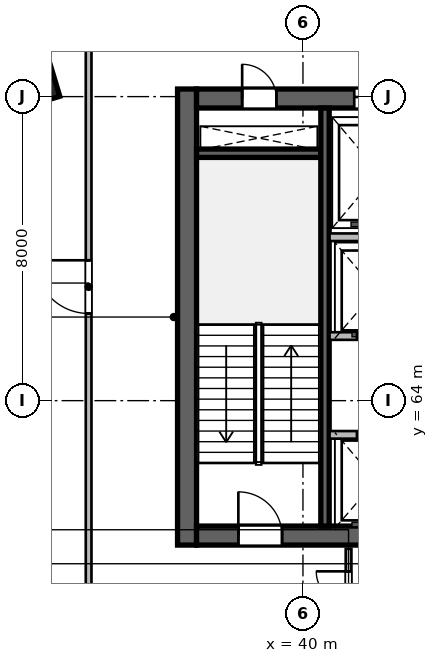
"""IFC4 building model, lengths in metres.
Left out: names, types, materials, properties, quantities, classifications, styles, units other than length and angle.
Written with IfcOpenShell. Run it as: python <this file> out.ifc"""

import sys

from ifc_helpers import new_model, si_unit, direction, frame, frame_2d, origin, origin_2d, place, context, subcontext, project, spatial, rectangle, extrude, source, transform, mapped, element, fill, save


model = new_model("IFC4")
c1 = context("Model", 3, precision=1e-05, world=origin(), true_north=direction((0.0, 1.0)))
c2 = subcontext(c1, "Body", "Model", "MODEL_VIEW")
j1 = project(units=[si_unit("LENGTHUNIT", "METRE"), si_unit("PLANEANGLEUNIT", "RADIAN")], contexts=[c1])
p1 = place(None, origin())
s1 = spatial("IfcSite", under=j1, at=p1, CompositionType="ELEMENT")
p2 = place(p1, origin())
s2 = spatial("IfcBuilding", under=s1, at=p2, CompositionType="ELEMENT")
p3 = place(p2, frame((0.0, 0.0, 91.2)))
s3 = spatial("IfcBuildingStorey", under=s2, at=p3, CompositionType="ELEMENT", Elevation=91.2)
m1 = source(origin(), c2, "Body", "SweptSolid", [
    extrude(rectangle(XDim=12.0, YDim=0.5, at=frame_2d((6.0, 0.0))), origin(), (0.0, 0.0, 1.0), 4.8),
])
p4 = place(p3, frame((36.95, 60.2, 0.0), z_axis=(0.0, 0.0, 1.0), x_axis=(0.0, 1.0, 0.0)))
e1 = element("IfcWall", 1, at=p4, inside=s3, PredefinedType="SHEAR", context=c2, shape_type="MappedRepresentation", body=[
    mapped(m1, transform((0.0, 0.0, 0.0), scale=1.0)),
])
m2 = source(origin(), c2, "Body", "SweptSolid", [
    extrude(rectangle(XDim=21.6, YDim=0.5, at=frame_2d((10.8, 0.0))), origin(), (0.0, 0.0, 1.0), 4.8),
])
p5 = place(p3, frame((37.2, 60.45, 0.0), z_axis=(0.0, 0.0, 1.0), x_axis=(1.0, 0.0, 0.0)))
e2 = element("IfcWall", 2, at=p5, inside=s3, PredefinedType="SHEAR", context=c2, shape_type="MappedRepresentation", body=[
    mapped(m2, transform((0.0, 0.0, 0.0), scale=1.0)),
])
p6 = place(p5, frame((1.1, 0.0, 0.0)))
e3 = element("IfcOpeningElement", 3, at=p6, cuts=e2, PredefinedType="OPENING", context=c2, shape_type="SweptSolid", body=[
    extrude(rectangle(XDim=1.15, YDim=2.15, at=frame_2d((0.575, 1.075))), frame((0.0, 0.26, 0.0), z_axis=(0.0, -1.0, 0.0), x_axis=(1.0, 0.0, 0.0)), (0.0, 0.0, 1.0), 0.52),
])
p7 = place(p5, frame((19.5, 0.0, 0.0)))
e4 = element("IfcOpeningElement", 4, at=p7, cuts=e2, PredefinedType="OPENING", context=c2, shape_type="SweptSolid", body=[
    extrude(rectangle(XDim=0.9, YDim=2.1, at=frame_2d((0.45, 1.05))), frame((0.0, 0.26, 0.0), z_axis=(0.0, -1.0, 0.0), x_axis=(1.0, 0.0, 0.0)), (0.0, 0.0, 1.0), 0.52),
])
p8 = place(p5, frame((12.02, 0.0, 0.0)))
e5 = element("IfcOpeningElement", 5, at=p8, cuts=e2, PredefinedType="OPENING", context=c2, shape_type="SweptSolid", body=[
    extrude(rectangle(XDim=1.6, YDim=2.15, at=frame_2d((0.8, 1.075))), frame((0.0, 0.26, 0.0), z_axis=(0.0, -1.0, 0.0), x_axis=(1.0, 0.0, 0.0)), (0.0, 0.0, 1.0), 0.52),
])
p9 = place(p3, frame((37.2, 71.95, 0.0), z_axis=(0.0, 0.0, 1.0), x_axis=(1.0, 0.0, 0.0)))
e6 = element("IfcWall", 6, at=p9, inside=s3, PredefinedType="SHEAR", context=c2, shape_type="MappedRepresentation", body=[
    mapped(m2, transform((0.0, 0.0, 0.0), scale=1.0)),
])
p10 = place(p9, frame((1.2, 0.0, 0.0)))
e7 = element("IfcOpeningElement", 7, at=p10, cuts=e6, PredefinedType="OPENING", context=c2, shape_type="SweptSolid", body=[
    extrude(rectangle(XDim=0.9, YDim=2.1, at=frame_2d((0.45, 1.05))), frame((0.0, 0.26, 0.0), z_axis=(0.0, -1.0, 0.0), x_axis=(1.0, 0.0, 0.0)), (0.0, 0.0, 1.0), 0.52),
])
p11 = place(p9, frame((14.7, 0.0, 0.0)))
e8 = element("IfcOpeningElement", 8, at=p11, cuts=e6, PredefinedType="OPENING", context=c2, shape_type="SweptSolid", body=[
    extrude(rectangle(XDim=1.2, YDim=2.15, at=frame_2d((0.6, 1.075))), frame((0.0, 0.26, 0.0), z_axis=(0.0, -1.0, 0.0), x_axis=(1.0, 0.0, 0.0)), (0.0, 0.0, 1.0), 0.52),
])
p12 = place(p9, frame((4.15, 0.0, 0.0)))
e9 = element("IfcOpeningElement", 9, at=p12, cuts=e6, PredefinedType="OPENING", context=c2, shape_type="SweptSolid", body=[
    extrude(rectangle(XDim=1.3, YDim=2.15, at=frame_2d((0.65, 1.075))), frame((0.0, 0.26, 0.0), z_axis=(0.0, -1.0, 0.0), x_axis=(1.0, 0.0, 0.0)), (0.0, 0.0, 1.0), 0.52),
])
p13 = place(p9, frame((7.25, 0.0, 0.0)))
e10 = element("IfcOpeningElement", 10, at=p13, cuts=e6, PredefinedType="OPENING", context=c2, shape_type="SweptSolid", body=[
    extrude(rectangle(XDim=0.9, YDim=2.1, at=frame_2d((0.45, 1.05))), frame((0.0, 0.26, 0.0), z_axis=(0.0, -1.0, 0.0), x_axis=(1.0, 0.0, 0.0)), (0.0, 0.0, 1.0), 0.52),
])
m3 = source(origin(), c2, "Body", "SweptSolid", [
    extrude(rectangle(XDim=3.27, YDim=0.22, at=frame_2d((1.635, 0.0))), origin(), (0.0, 0.0, 1.0), 4.8),
])
p14 = place(p3, frame((37.2, 70.51, 0.0), z_axis=(0.0, 0.0, 1.0), x_axis=(1.0, 0.0, 0.0)))
e11 = element("IfcWall", 11, at=p14, inside=s3, PredefinedType="SHEAR", context=c2, shape_type="MappedRepresentation", body=[
    mapped(m3, transform((0.0, 0.0, 0.0), scale=1.0)),
])
m4 = source(origin(), c2, "Body", "SweptSolid", [
    extrude(rectangle(XDim=11.0, YDim=0.22, at=frame_2d((5.5, 0.0))), origin(), (0.0, 0.0, 1.0), 4.8),
])
p15 = place(p3, frame((40.58, 60.7, 0.0), z_axis=(0.0, 0.0, 1.0), x_axis=(0.0, 1.0, 0.0)))
e12 = element("IfcWall", 12, at=p15, inside=s3, PredefinedType="SHEAR", context=c2, shape_type="MappedRepresentation", body=[
    mapped(m4, transform((0.0, 0.0, 0.0), scale=1.0)),
])
m5 = source(origin(), c2, "Body", "SweptSolid", [
    extrude(rectangle(XDim=1.3, YDim=1.3, at=origin_2d()), origin(), (0.0, 0.0, 1.0), 4.8),
])
p16 = place(p3, frame((32.791, 72.442, 0.0), z_axis=(0.0, 0.0, 1.0), x_axis=(-0.288697611798, 0.957420330337, 0.0)))
e13 = element("IfcColumn", 13, at=p16, inside=s3, PredefinedType="COLUMN", context=c2, shape_type="MappedRepresentation", body=[
    mapped(m5, transform((0.0, 0.0, 0.0), scale=1.0)),
])
m6 = source(origin(), c2, "Body", "SweptSolid", [
    extrude(rectangle(XDim=8.8, YDim=0.2, at=frame_2d((4.4, 0.0))), origin(), (0.0, 0.0, 1.0), 4.55),
])
p17 = place(p3, frame((40.7, 68.3, 0.0), z_axis=(0.0, 0.0, 1.0), x_axis=(1.0, 0.0, 0.0)))
e14 = element("IfcWall", 14, at=p17, inside=s3, PredefinedType="SOLIDWALL", context=c2, shape_type="MappedRepresentation", body=[
    mapped(m6, transform((0.0, 0.0, 0.0), scale=1.0)),
])
m7 = source(origin(), c2, "Body", "SweptSolid", [
    extrude(rectangle(XDim=8.02, YDim=0.2, at=frame_2d((4.01, 0.0))), origin(), (0.0, 0.0, 1.0), 4.55),
])
p18 = place(p3, frame((40.7, 63.1, 0.0), z_axis=(0.0, 0.0, 1.0), x_axis=(1.0, 0.0, 0.0)))
e15 = element("IfcWall", 15, at=p18, inside=s3, PredefinedType="SOLIDWALL", context=c2, shape_type="MappedRepresentation", body=[
    mapped(m7, transform((0.0, 0.0, 0.0), scale=1.0)),
])
p19 = place(p18, frame((0.72, 0.0, 0.0)))
e16 = element("IfcOpeningElement", 16, at=p19, cuts=e15, PredefinedType="OPENING", context=c2, shape_type="SweptSolid", body=[
    extrude(rectangle(XDim=1.0, YDim=2.15, at=frame_2d((0.5, 1.075))), frame((0.0, 0.11, 0.0), z_axis=(0.0, -1.0, 0.0), x_axis=(1.0, 0.0, 0.0)), (0.0, 0.0, 1.0), 0.22),
])
p20 = place(p18, frame((2.62, 0.0, 0.0)))
e17 = element("IfcOpeningElement", 17, at=p20, cuts=e15, PredefinedType="OPENING", context=c2, shape_type="SweptSolid", body=[
    extrude(rectangle(XDim=1.0, YDim=2.15, at=frame_2d((0.5, 1.075))), frame((0.0, 0.11, 0.0), z_axis=(0.0, -1.0, 0.0), x_axis=(1.0, 0.0, 0.0)), (0.0, 0.0, 1.0), 0.22),
])
p21 = place(p18, frame((4.55, 0.0, 0.0)))
e18 = element("IfcOpeningElement", 18, at=p21, cuts=e15, PredefinedType="OPENING", context=c2, shape_type="SweptSolid", body=[
    extrude(rectangle(XDim=1.0, YDim=2.15, at=frame_2d((0.5, 1.075))), frame((0.0, 0.11, 0.0), z_axis=(0.0, -1.0, 0.0), x_axis=(1.0, 0.0, 0.0)), (0.0, 0.0, 1.0), 0.22),
])
p22 = place(p18, frame((6.55, 0.0, 0.0)))
e19 = element("IfcOpeningElement", 19, at=p22, cuts=e15, PredefinedType="OPENING", context=c2, shape_type="SweptSolid", body=[
    extrude(rectangle(XDim=1.0, YDim=2.15, at=frame_2d((0.5, 1.075))), frame((0.0, 0.11, 0.0), z_axis=(0.0, -1.0, 0.0), x_axis=(1.0, 0.0, 0.0)), (0.0, 0.0, 1.0), 0.22),
])
p23 = place(p3, frame((40.7, 65.7, 0.0), z_axis=(0.0, 0.0, 1.0), x_axis=(1.0, 0.0, 0.0)))
e20 = element("IfcWall", 20, at=p23, inside=s3, PredefinedType="SOLIDWALL", context=c2, shape_type="MappedRepresentation", body=[
    mapped(m6, transform((0.0, 0.0, 0.0), scale=1.0)),
])
p24 = place(p23, frame((0.72, 0.0, 0.0)))
e21 = element("IfcOpeningElement", 21, at=p24, cuts=e20, PredefinedType="OPENING", context=c2, shape_type="SweptSolid", body=[
    extrude(rectangle(XDim=1.0, YDim=2.15, at=frame_2d((0.5, 1.075))), frame((0.0, 0.11, 0.0), z_axis=(0.0, -1.0, 0.0), x_axis=(1.0, 0.0, 0.0)), (0.0, 0.0, 1.0), 0.22),
])
p25 = place(p23, frame((2.62, 0.0, 0.0)))
e22 = element("IfcOpeningElement", 22, at=p25, cuts=e20, PredefinedType="OPENING", context=c2, shape_type="SweptSolid", body=[
    extrude(rectangle(XDim=1.0, YDim=2.15, at=frame_2d((0.5, 1.075))), frame((0.0, 0.11, 0.0), z_axis=(0.0, -1.0, 0.0), x_axis=(1.0, 0.0, 0.0)), (0.0, 0.0, 1.0), 0.22),
])
p26 = place(p23, frame((4.55, 0.0, 0.0)))
e23 = element("IfcOpeningElement", 23, at=p26, cuts=e20, PredefinedType="OPENING", context=c2, shape_type="SweptSolid", body=[
    extrude(rectangle(XDim=1.0, YDim=2.15, at=frame_2d((0.5, 1.075))), frame((0.0, 0.11, 0.0), z_axis=(0.0, -1.0, 0.0), x_axis=(1.0, 0.0, 0.0)), (0.0, 0.0, 1.0), 0.22),
])
p27 = place(p23, frame((6.55, 0.0, 0.0)))
e24 = element("IfcOpeningElement", 24, at=p27, cuts=e20, PredefinedType="OPENING", context=c2, shape_type="SweptSolid", body=[
    extrude(rectangle(XDim=1.0, YDim=2.15, at=frame_2d((0.5, 1.075))), frame((0.0, 0.11, 0.0), z_axis=(0.0, -1.0, 0.0), x_axis=(1.0, 0.0, 0.0)), (0.0, 0.0, 1.0), 0.22),
])
m8 = source(origin(), c2, "Body", "SweptSolid", [
    extrude(rectangle(XDim=2.033, YDim=0.15, at=frame_2d((1.016, 0.0))), origin(), (0.0, 0.0, 1.0), 4.55),
])
p28 = place(p3, frame((41.2, 58.067, 0.0), z_axis=(0.0, 0.0, 1.0), x_axis=(0.0, 1.0, 0.0)))
e25 = element("IfcWall", 25, at=p28, inside=s3, PredefinedType="PARTITIONING", context=c2, shape_type="MappedRepresentation", body=[
    mapped(m8, transform((0.0, 0.0, 0.0), scale=1.0)),
])
p29 = place(p28, frame((0.591, 0.0, 0.0)))
e26 = element("IfcOpeningElement", 26, at=p29, cuts=e25, PredefinedType="OPENING", context=c2, shape_type="SweptSolid", body=[
    extrude(rectangle(XDim=0.85, YDim=2.1, at=frame_2d((0.425, 1.05))), frame((0.0, 0.085, 0.0), z_axis=(0.0, -1.0, 0.0), x_axis=(1.0, 0.0, 0.0)), (0.0, 0.0, 1.0), 0.17),
])
m9 = source(origin(), c2, "Body", "SweptSolid", [
    extrude(rectangle(XDim=18.067, YDim=0.15, at=frame_2d((9.034, 0.0))), origin(), (0.0, 0.0, 1.0), 4.55),
])
p30 = place(p3, frame((34.36, 57.96, 0.0), z_axis=(0.0, 0.0, 1.0), x_axis=(0.0, 1.0, 0.0)))
e27 = element("IfcWall", 27, at=p30, inside=s3, PredefinedType="PARTITIONING", context=c2, shape_type="MappedRepresentation", body=[
    mapped(m9, transform((0.0, 0.0, 0.0), scale=1.0)),
])
p31 = place(p30, frame((8.333, 0.0, 0.0)))
e28 = element("IfcOpeningElement", 28, at=p31, cuts=e27, PredefinedType="OPENING", context=c2, shape_type="SweptSolid", body=[
    extrude(rectangle(XDim=1.4, YDim=2.15, at=frame_2d((0.7, 1.075))), frame((0.0, 0.085, 0.0), z_axis=(0.0, -1.0, 0.0), x_axis=(1.0, 0.0, 0.0)), (0.0, 0.0, 1.0), 0.17),
])
m10 = source(origin(), c2, "Body", "SweptSolid", [
    extrude(rectangle(XDim=1.15, YDim=2.15, at=frame_2d((0.575, 1.075))), frame((0.0, 0.025, 0.0), z_axis=(0.0, -1.0, 0.0), x_axis=(1.0, 0.0, 0.0)), (0.0, 0.0, 1.0), 0.05),
])
p32 = place(p6, origin())
e29 = element("IfcDoor", 29, at=p32, inside=s3, OperationType="SINGLE_SWING_LEFT", PredefinedType="DOOR", context=c2, shape_type="MappedRepresentation", body=[
    mapped(m10, transform((0.0, 0.0, 0.0), scale=1.0)),
])
fill(e3, e29)
m11 = source(origin(), c2, "Body", "SweptSolid", [
    extrude(rectangle(XDim=0.9, YDim=2.1, at=frame_2d((0.45, 1.05))), frame((0.0, 0.025, 0.0), z_axis=(0.0, -1.0, 0.0), x_axis=(1.0, 0.0, 0.0)), (0.0, 0.0, 1.0), 0.05),
])
p33 = place(p10, origin())
e30 = element("IfcDoor", 30, at=p33, inside=s3, OperationType="SINGLE_SWING_LEFT", PredefinedType="DOOR", context=c2, shape_type="MappedRepresentation", body=[
    mapped(m11, transform((0.0, 0.0, 0.0), scale=1.0)),
])
fill(e7, e30)
m12 = source(origin(), c2, "Body", "SweptSolid", [
    extrude(rectangle(XDim=1.3, YDim=2.15, at=frame_2d((0.65, 1.075))), frame((0.0, 0.025, 0.0), z_axis=(0.0, -1.0, 0.0), x_axis=(1.0, 0.0, 0.0)), (0.0, 0.0, 1.0), 0.05),
])
p34 = place(p12, origin())
e31 = element("IfcDoor", 31, at=p34, inside=s3, OperationType="DOUBLE_DOOR_SLIDING", PredefinedType="DOOR", context=c2, shape_type="MappedRepresentation", body=[
    mapped(m12, transform((0.0, 0.0, 0.0), scale=1.0)),
])
fill(e9, e31)
m13 = source(origin(), c2, "Body", "SweptSolid", [
    extrude(rectangle(XDim=1.0, YDim=2.15, at=frame_2d((0.5, 1.075))), frame((0.0, 0.025, 0.0), z_axis=(0.0, -1.0, 0.0), x_axis=(1.0, 0.0, 0.0)), (0.0, 0.0, 1.0), 0.05),
])
p35 = place(p19, origin())
e32 = element("IfcDoor", 32, at=p35, inside=s3, OperationType="DOUBLE_DOOR_SLIDING", PredefinedType="DOOR", context=c2, shape_type="MappedRepresentation", body=[
    mapped(m13, transform((0.0, 0.0, 0.0), scale=1.0)),
])
fill(e16, e32)
p36 = place(p24, origin())
e33 = element("IfcDoor", 33, at=p36, inside=s3, OperationType="DOUBLE_DOOR_SLIDING", PredefinedType="DOOR", context=c2, shape_type="MappedRepresentation", body=[
    mapped(m13, transform((0.0, 0.0, 0.0), scale=1.0)),
])
fill(e21, e33)
m14 = source(origin(), c2, "Body", "SweptSolid", [
    extrude(rectangle(XDim=0.85, YDim=2.1, at=frame_2d((0.425, 1.05))), frame((0.0, 0.025, 0.0), z_axis=(0.0, -1.0, 0.0), x_axis=(1.0, 0.0, 0.0)), (0.0, 0.0, 1.0), 0.05),
])
p37 = place(p29, origin())
e34 = element("IfcDoor", 34, at=p37, inside=s3, OperationType="SINGLE_SWING_RIGHT", PredefinedType="DOOR", context=c2, shape_type="MappedRepresentation", body=[
    mapped(m14, transform((0.0, 0.0, 0.0), scale=1.0)),
])
fill(e26, e34)
m15 = source(origin(), c2, "Body", "SweptSolid", [
    extrude(rectangle(XDim=1.4, YDim=2.15, at=frame_2d((0.7, 1.075))), frame((0.0, 0.025, 0.0), z_axis=(0.0, -1.0, 0.0), x_axis=(1.0, 0.0, 0.0)), (0.0, 0.0, 1.0), 0.05),
])
p38 = place(p31, origin())
e35 = element("IfcDoor", 35, at=p38, inside=s3, OperationType="SINGLE_SWING_RIGHT", PredefinedType="DOOR", context=c2, shape_type="MappedRepresentation", body=[
    mapped(m15, transform((0.0, 0.0, 0.0), scale=1.0)),
])
fill(e28, e35)
save(model, sys.argv[1])
